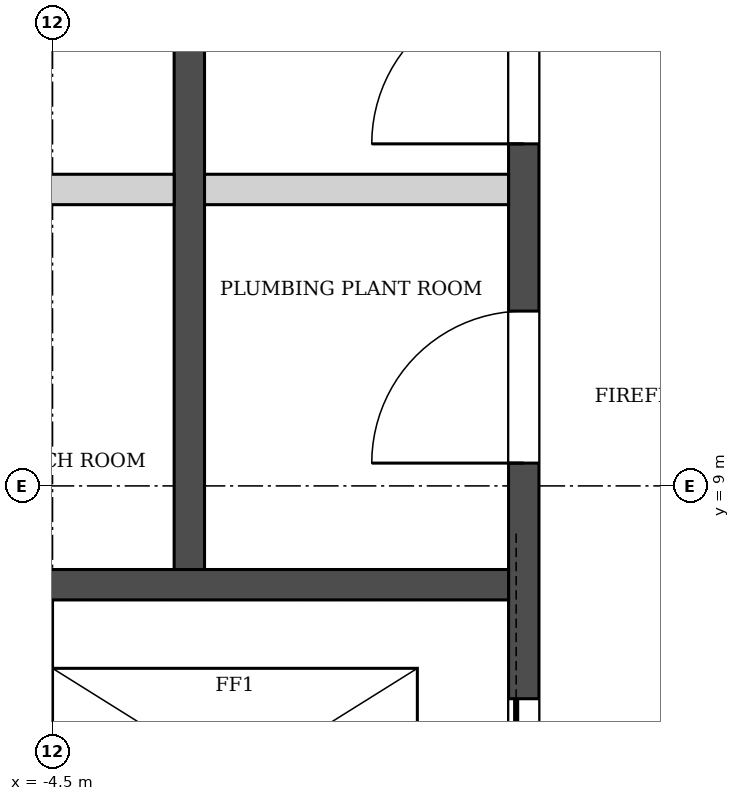
"""IFC4 building model, lengths in metres.
Left out: names, types, materials, properties, quantities, classifications, styles, units other than length and angle.
Written with IfcOpenShell. Run it as: python <this file> out.ifc"""

import sys

from ifc_helpers import new_model, si_unit, direction, frame, frame_2d, origin, place, context, subcontext, project, spatial, rectangle, extrude, element, fill, save


model = new_model("IFC4")
c1 = context("Model", 3, precision=1e-05, world=origin(), true_north=direction((0.0, 1.0)))
c2 = subcontext(c1, "Body", "Model", "MODEL_VIEW")
j1 = project(units=[si_unit("LENGTHUNIT", "METRE"), si_unit("PLANEANGLEUNIT", "RADIAN")], contexts=[c1])
p1 = place(None, origin())
s1 = spatial("IfcSite", under=j1, at=p1, CompositionType="ELEMENT")
p2 = place(p1, origin())
s2 = spatial("IfcBuilding", under=s1, at=p2, CompositionType="ELEMENT")
p3 = place(p2, frame((0.0, 0.0, 174.9)))
s3 = spatial("IfcBuildingStorey", under=s2, at=p3, CompositionType="ELEMENT", Elevation=174.9)
p4 = place(p3, frame((-4.353, 49.112, 0.0), z_axis=(0.0, 0.0, 1.0), x_axis=(-0.500002420408, -0.866024006357, 0.0)))
e1 = element("IfcWall", 1, at=p4, inside=s3, PredefinedType="SOLIDWALL", context=c2, shape_type="SweptSolid", body=[
    extrude(rectangle(XDim=47.807, YDim=0.34, at=frame_2d((23.904, 0.0))), origin(), (0.0, 0.0, 1.0), 6.8),
])
p5 = place(p3, frame((-3.6, 8.45, -0.4), z_axis=(0.0, 0.0, 1.0), x_axis=(0.0, 1.0, 0.0)))
e2 = element("IfcWall", 2, at=p5, inside=s3, PredefinedType="SOLIDWALL", context=c2, shape_type="SweptSolid", body=[
    extrude(rectangle(XDim=7.8, YDim=0.2, at=frame_2d((3.9, 0.0))), origin(), (0.0, 0.0, 1.0), 7.2),
])
p6 = place(p3, frame((-1.4, 5.85, -0.4), z_axis=(0.0, 0.0, 1.0), x_axis=(0.0, 1.0, 0.0)))
e3 = element("IfcWall", 3, at=p6, inside=s3, PredefinedType="SOLIDWALL", context=c2, shape_type="SweptSolid", body=[
    extrude(rectangle(XDim=11.75, YDim=0.2, at=frame_2d((5.875, 0.0))), origin(), (0.0, 0.0, 1.0), 7.2),
])
p7 = place(p6, frame((0.65, 0.0, 0.4)))
e4 = element("IfcOpeningElement", 4, at=p7, cuts=e3, PredefinedType="OPENING", context=c2, shape_type="SweptSolid", body=[
    extrude(rectangle(XDim=1.1, YDim=2.1, at=frame_2d((0.55, 1.05))), frame((0.0, 0.11, 0.0), z_axis=(0.0, -1.0, 0.0), x_axis=(1.0, 0.0, 0.0)), (0.0, 0.0, 1.0), 0.22),
])
p8 = place(p6, frame((3.3, 0.0, 0.4)))
e5 = element("IfcOpeningElement", 5, at=p8, cuts=e3, PredefinedType="OPENING", context=c2, shape_type="SweptSolid", body=[
    extrude(rectangle(XDim=1.0, YDim=2.1, at=frame_2d((0.5, 1.05))), frame((0.0, 0.11, 0.0), z_axis=(0.0, -1.0, 0.0), x_axis=(1.0, 0.0, 0.0)), (0.0, 0.0, 1.0), 0.22),
])
p9 = place(p6, frame((5.4, 0.0, 0.4)))
e6 = element("IfcOpeningElement", 6, at=p9, cuts=e3, PredefinedType="OPENING", context=c2, shape_type="SweptSolid", body=[
    extrude(rectangle(XDim=1.0, YDim=2.1, at=frame_2d((0.5, 1.05))), frame((0.0, 0.11, 0.0), z_axis=(0.0, -1.0, 0.0), x_axis=(1.0, 0.0, 0.0)), (0.0, 0.0, 1.0), 0.22),
])
p10 = place(p3, frame((-5.7, 8.35, -0.4), z_axis=(0.0, 0.0, 1.0), x_axis=(1.0, 0.0, 0.0)))
e7 = element("IfcWall", 7, at=p10, inside=s3, PredefinedType="SOLIDWALL", context=c2, shape_type="SweptSolid", body=[
    extrude(rectangle(XDim=4.2, YDim=0.2, at=frame_2d((2.1, 0.0))), origin(), (0.0, 0.0, 1.0), 7.2),
])
for number, where, z_axis, x_axis in (
    (8, (-5.7, 10.95, 0.0), (0.0, 0.0, 1.0), (1.0, 0.0, 0.0)),
    (9, (-3.5, 10.95, 0.0), (0.0, 0.0, 1.0), (1.0, 0.0, 0.0)),
):
    element("IfcWall", number, at=place(p3, frame(where, z_axis=z_axis, x_axis=x_axis)), inside=s3, PredefinedType="SOLIDWALL", context=c2, shape_type="SweptSolid", body=[
        extrude(rectangle(XDim=2.0, YDim=0.2, at=frame_2d((1.0, 0.0))), origin(), (0.0, 0.0, 1.0), 6.8),
    ])
p11 = place(p7, origin())
e10 = element("IfcDoor", 10, at=p11, inside=s3, OperationType="SLIDING_TO_RIGHT", PredefinedType="DOOR", context=c2, shape_type="SweptSolid", body=[
    extrude(rectangle(XDim=1.1, YDim=2.1, at=frame_2d((0.55, 1.05))), frame((0.0, 0.025, 0.0), z_axis=(0.0, -1.0, 0.0), x_axis=(1.0, 0.0, 0.0)), (0.0, 0.0, 1.0), 0.05),
])
fill(e4, e10)
p12 = place(p8, origin())
e11 = element("IfcDoor", 11, at=p12, inside=s3, OperationType="SINGLE_SWING_LEFT", PredefinedType="DOOR", context=c2, shape_type="SweptSolid", body=[
    extrude(rectangle(XDim=1.0, YDim=2.1, at=frame_2d((0.5, 1.05))), frame((0.0, 0.025, 0.0), z_axis=(0.0, -1.0, 0.0), x_axis=(1.0, 0.0, 0.0)), (0.0, 0.0, 1.0), 0.05),
])
fill(e5, e11)
p13 = place(p9, origin())
e12 = element("IfcDoor", 12, at=p13, inside=s3, OperationType="SINGLE_SWING_LEFT", PredefinedType="DOOR", context=c2, shape_type="SweptSolid", body=[
    extrude(rectangle(XDim=1.0, YDim=2.1, at=frame_2d((0.5, 1.05))), frame((0.0, 0.025, 0.0), z_axis=(0.0, -1.0, 0.0), x_axis=(1.0, 0.0, 0.0)), (0.0, 0.0, 1.0), 0.05),
])
fill(e6, e12)
save(model, sys.argv[1])
